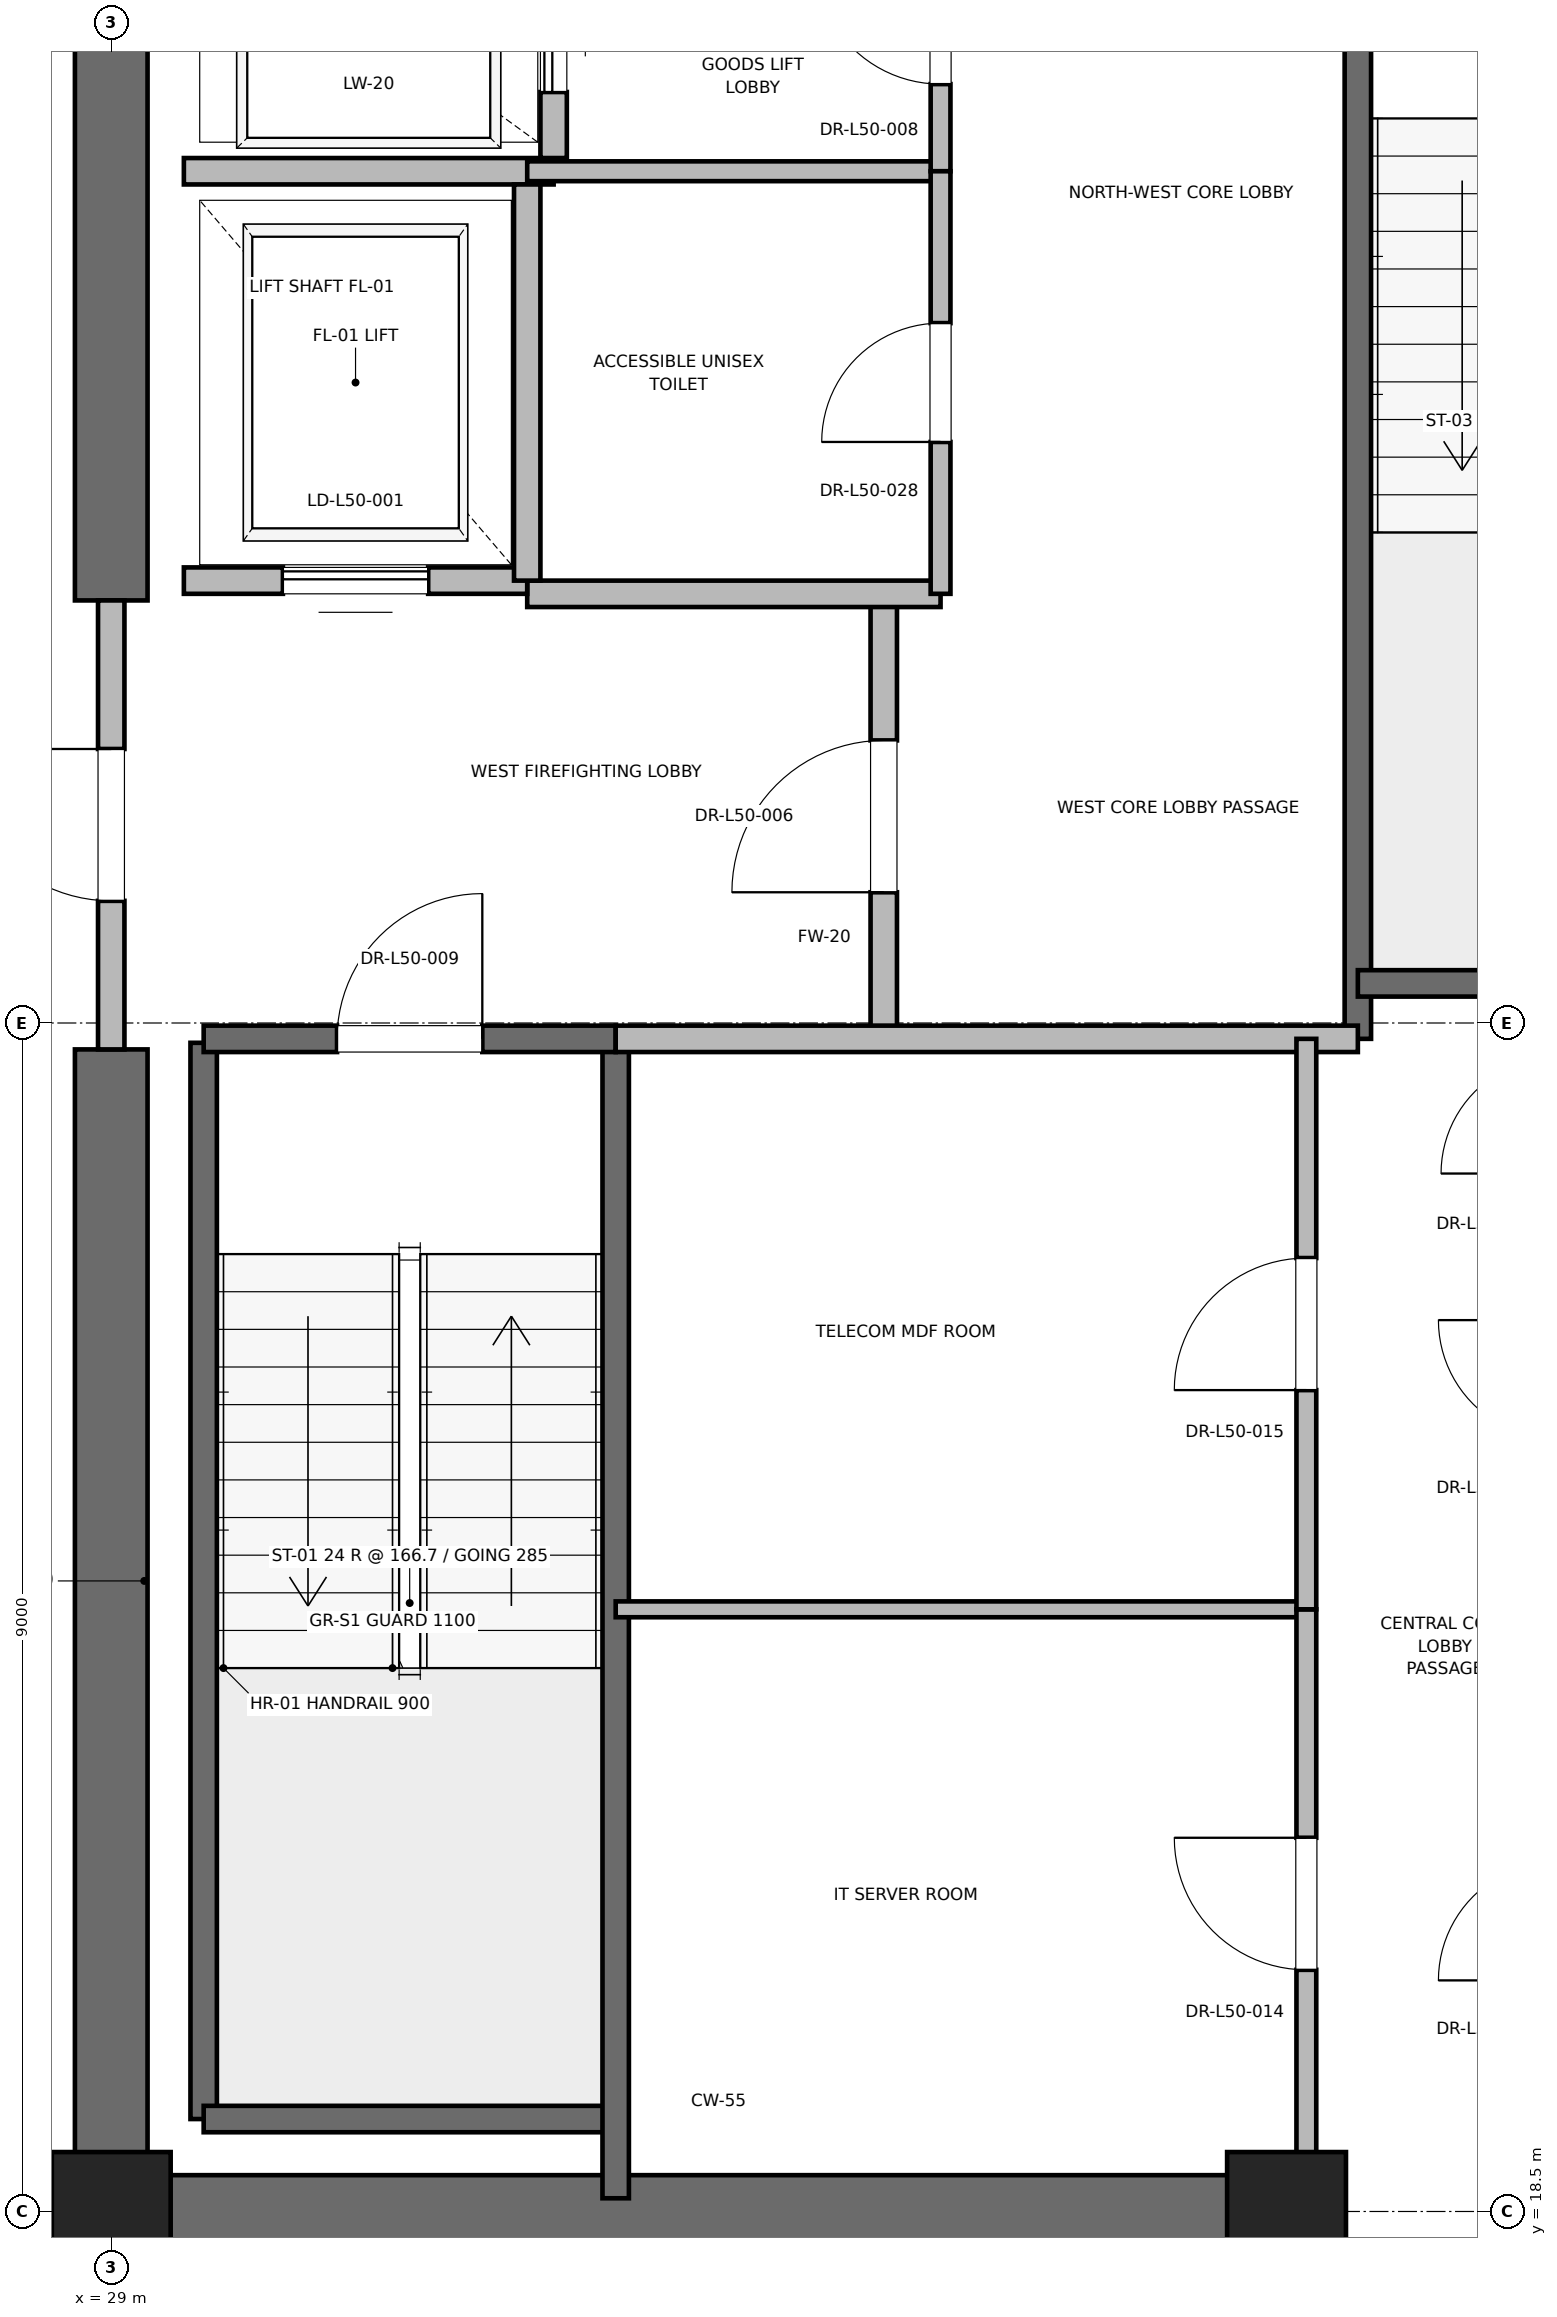
"""IFC4 building model, lengths in metres.
Left out: names, types, materials, properties, quantities, classifications, styles, units other than length and angle.
Written with IfcOpenShell. Run it as: python <this file> out.ifc"""

import sys

from ifc_helpers import new_model, si_unit, direction, frame, frame_2d, origin, origin_2d, place, context, subcontext, project, spatial, rectangle, extrude, element, fill, save


model = new_model("IFC4")
c1 = context("Model", 3, precision=1e-05, world=origin(), true_north=direction((0.0, 1.0)))
c2 = subcontext(c1, "Body", "Model", "MODEL_VIEW")
j1 = project(units=[si_unit("LENGTHUNIT", "METRE"), si_unit("PLANEANGLEUNIT", "RADIAN")], contexts=[c1])
p1 = place(None, origin())
s1 = spatial("IfcSite", under=j1, at=p1, CompositionType="ELEMENT")
p2 = place(p1, origin())
s2 = spatial("IfcBuilding", under=s1, at=p2, CompositionType="ELEMENT")
p3 = place(p2, frame((0.0, 0.0, 217.2)))
s3 = spatial("IfcBuildingStorey", under=s2, at=p3, CompositionType="ELEMENT", Elevation=217.2)
for number, where, z_axis, x_axis in (
    (1, (29.0, 18.5, 0.0), (0.0, 0.0, 1.0), (1.0, 0.0, 0.0)),
    (2, (37.9, 18.5, 0.0), (0.0, 0.0, 1.0), (1.0, 0.0, 0.0)),
):
    element("IfcColumn", number, at=place(p3, frame(where, z_axis=z_axis, x_axis=x_axis)), inside=s3, PredefinedType="PILASTER", context=c2, shape_type="SweptSolid", body=[
        extrude(rectangle(XDim=0.9, YDim=0.9, at=origin_2d()), origin(), (0.0, 0.0, 1.0), 4.0),
    ])
p4 = place(p3, frame((29.0, 18.5, 0.0), z_axis=(0.0, 0.0, 1.0), x_axis=(1.0, 0.0, 0.0)))
e3 = element("IfcWall", 3, at=p4, inside=s3, PredefinedType="SHEAR", context=c2, shape_type="SweptSolid", body=[
    extrude(rectangle(XDim=9.2, YDim=0.55, at=frame_2d((4.6, 0.0))), origin(), (0.0, 0.0, 1.0), 3.775),
])
p5 = place(p3, frame((29.0, 18.5, 0.0), z_axis=(0.0, 0.0, 1.0), x_axis=(0.0, 1.0, 0.0)))
e4 = element("IfcWall", 4, at=p5, inside=s3, PredefinedType="SHEAR", context=c2, shape_type="SweptSolid", body=[
    extrude(rectangle(XDim=8.8, YDim=0.55, at=frame_2d((4.4, 0.0))), origin(), (0.0, 0.0, 1.0), 3.775),
])
p6 = place(p3, frame((29.0, 30.7, 0.0), z_axis=(0.0, 0.0, 1.0), x_axis=(0.0, 1.0, 0.0)))
e5 = element("IfcWall", 5, at=p6, inside=s3, PredefinedType="SHEAR", context=c2, shape_type="SweptSolid", body=[
    extrude(rectangle(XDim=5.8, YDim=0.55, at=frame_2d((2.9, 0.0))), origin(), (0.0, 0.0, 1.0), 3.775),
])
p7 = place(p3, frame((29.7, 19.2, 0.0), z_axis=(0.0, 0.0, 1.0), x_axis=(0.0, 1.0, 0.0)))
e6 = element("IfcWall", 6, at=p7, inside=s3, PredefinedType="SOLIDWALL", context=c2, shape_type="SweptSolid", body=[
    extrude(rectangle(XDim=8.15, YDim=0.2, at=frame_2d((4.075, 0.0))), origin(), (0.0, 0.0, 1.0), 3.775),
])
p8 = place(p3, frame((29.7, 19.2, 0.0), z_axis=(0.0, 0.0, 1.0), x_axis=(1.0, 0.0, 0.0)))
e7 = element("IfcWall", 7, at=p8, inside=s3, PredefinedType="SOLIDWALL", context=c2, shape_type="SweptSolid", body=[
    extrude(rectangle(XDim=3.12, YDim=0.2, at=frame_2d((1.56, 0.0))), origin(), (0.0, 0.0, 1.0), 3.775),
])
p9 = place(p3, frame((32.82, 18.6, 0.0), z_axis=(0.0, 0.0, 1.0), x_axis=(0.0, 1.0, 0.0)))
e8 = element("IfcWall", 8, at=p9, inside=s3, PredefinedType="SOLIDWALL", context=c2, shape_type="SweptSolid", body=[
    extrude(rectangle(XDim=8.78, YDim=0.2, at=frame_2d((4.39, 0.0))), origin(), (0.0, 0.0, 1.0), 3.775),
])
p10 = place(p3, frame((29.7, 27.38, 0.0), z_axis=(0.0, 0.0, 1.0), x_axis=(1.0, 0.0, 0.0)))
e9 = element("IfcWall", 9, at=p10, inside=s3, PredefinedType="SOLIDWALL", context=c2, shape_type="SweptSolid", body=[
    extrude(rectangle(XDim=3.12, YDim=0.2, at=frame_2d((1.56, 0.0))), origin(), (0.0, 0.0, 1.0), 3.775),
])
p11 = place(p10, frame((1.01, 0.0, 0.0)))
e10 = element("IfcOpeningElement", 10, at=p11, cuts=e9, PredefinedType="OPENING", context=c2, shape_type="SweptSolid", body=[
    extrude(rectangle(XDim=1.1, YDim=2.15, at=frame_2d((0.55, 1.075))), frame((0.0, 0.1, 0.0), z_axis=(0.0, -1.0, 0.0), x_axis=(1.0, 0.0, 0.0)), (0.0, 0.0, 1.0), 0.2),
])
p12 = place(p3, frame((38.44, 27.38, 0.0), z_axis=(0.0, 0.0, 1.0), x_axis=(0.0, 1.0, 0.0)))
e11 = element("IfcWall", 11, at=p12, inside=s3, PredefinedType="SOLIDWALL", context=c2, shape_type="SweptSolid", body=[
    extrude(rectangle(XDim=8.87, YDim=0.2, at=frame_2d((4.435, 0.0))), origin(), (0.0, 0.0, 1.0), 3.775),
])
p13 = place(p3, frame((38.44, 27.8, 0.0), z_axis=(0.0, 0.0, 1.0), x_axis=(1.0, 0.0, 0.0)))
e12 = element("IfcWall", 12, at=p13, inside=s3, PredefinedType="SOLIDWALL", context=c2, shape_type="SweptSolid", body=[
    extrude(rectangle(XDim=3.32, YDim=0.2, at=frame_2d((1.66, 0.0))), origin(), (0.0, 0.0, 1.0), 3.775),
])
p14 = place(p3, frame((34.85, 27.38, 0.0), z_axis=(0.0, 0.0, 1.0), x_axis=(0.0, 1.0, 0.0)))
e13 = element("IfcWall", 13, at=p14, inside=s3, PredefinedType="PARTITIONING", context=c2, shape_type="SweptSolid", body=[
    extrude(rectangle(XDim=3.37, YDim=0.2, at=frame_2d((1.685, 0.0))), origin(), (0.0, 0.0, 1.0), 3.775),
])
p15 = place(p14, frame((1.11, 0.0, 0.0)))
e14 = element("IfcOpeningElement", 14, at=p15, cuts=e13, PredefinedType="OPENING", context=c2, shape_type="SweptSolid", body=[
    extrude(rectangle(XDim=1.15, YDim=2.2, at=frame_2d((0.575, 1.1))), frame((0.0, 0.1, 0.0), z_axis=(0.0, -1.0, 0.0), x_axis=(1.0, 0.0, 0.0)), (0.0, 0.0, 1.0), 0.2),
])
p16 = place(p3, frame((29.0, 27.3, 0.0), z_axis=(0.0, 0.0, 1.0), x_axis=(0.0, 1.0, 0.0)))
e15 = element("IfcWall", 15, at=p16, inside=s3, PredefinedType="PARTITIONING", context=c2, shape_type="SweptSolid", body=[
    extrude(rectangle(XDim=3.4, YDim=0.2, at=frame_2d((1.7, 0.0))), origin(), (0.0, 0.0, 1.0), 2.755),
])
p17 = place(p16, frame((1.125, 0.0, 0.0)))
e16 = element("IfcOpeningElement", 16, at=p17, cuts=e15, PredefinedType="OPENING", context=c2, shape_type="SweptSolid", body=[
    extrude(rectangle(XDim=1.15, YDim=2.2, at=frame_2d((0.575, 1.1))), frame((0.0, 0.1, 0.0), z_axis=(0.0, -1.0, 0.0), x_axis=(1.0, 0.0, 0.0)), (0.0, 0.0, 1.0), 0.2),
])
p18 = place(p3, frame((32.82, 27.38, 0.0), z_axis=(0.0, 0.0, 1.0), x_axis=(1.0, 0.0, 0.0)))
e17 = element("IfcWall", 17, at=p18, inside=s3, PredefinedType="PARTITIONING", context=c2, shape_type="SweptSolid", body=[
    extrude(rectangle(XDim=5.62, YDim=0.2, at=frame_2d((2.81, 0.0))), origin(), (0.0, 0.0, 1.0), 3.775),
])
p19 = place(p3, frame((32.15, 30.75, 0.0), z_axis=(0.0, 0.0, 1.0), x_axis=(1.0, 0.0, 0.0)))
e18 = element("IfcWall", 18, at=p19, inside=s3, PredefinedType="PARTITIONING", context=c2, shape_type="SweptSolid", body=[
    extrude(rectangle(XDim=3.13, YDim=0.2, at=frame_2d((1.565, 0.0))), origin(), (0.0, 0.0, 1.0), 3.775),
])
p20 = place(p3, frame((29.55, 30.85, 0.0), z_axis=(0.0, 0.0, 1.0), x_axis=(1.0, 0.0, 0.0)))
e19 = element("IfcWall", 19, at=p20, inside=s3, PredefinedType="SOLIDWALL", context=c2, shape_type="SweptSolid", body=[
    extrude(rectangle(XDim=2.6, YDim=0.2, at=frame_2d((1.3, 0.0))), origin(), (0.0, 0.0, 1.0), 2.755),
])
p21 = place(p20, frame((0.75, 0.0, 0.0)))
e20 = element("IfcOpeningElement", 20, at=p21, cuts=e19, PredefinedType="OPENING", context=c2, shape_type="SweptSolid", body=[
    extrude(rectangle(XDim=1.1, YDim=2.2, at=frame_2d((0.55, 1.1))), frame((0.0, 0.1, 0.0), z_axis=(0.0, -1.0, 0.0), x_axis=(1.0, 0.0, 0.0)), (0.0, 0.0, 1.0), 0.2),
])
p22 = place(p3, frame((29.55, 33.95, 0.0), z_axis=(0.0, 0.0, 1.0), x_axis=(1.0, 0.0, 0.0)))
e21 = element("IfcWall", 21, at=p22, inside=s3, PredefinedType="SOLIDWALL", context=c2, shape_type="SweptSolid", body=[
    extrude(rectangle(XDim=2.8, YDim=0.2, at=frame_2d((1.4, 0.0))), origin(), (0.0, 0.0, 1.0), 3.775),
])
p23 = place(p3, frame((32.15, 30.85, 0.0), z_axis=(0.0, 0.0, 1.0), x_axis=(0.0, 1.0, 0.0)))
e22 = element("IfcWall", 22, at=p23, inside=s3, PredefinedType="SOLIDWALL", context=c2, shape_type="SweptSolid", body=[
    extrude(rectangle(XDim=3.0, YDim=0.2, at=frame_2d((1.5, 0.0))), origin(), (0.0, 0.0, 1.0), 3.775),
])
p24 = place(p3, frame((32.35, 34.05, 0.0), z_axis=(0.0, 0.0, 1.0), x_axis=(0.0, 1.0, 0.0)))
e23 = element("IfcWall", 23, at=p24, inside=s3, PredefinedType="SOLIDWALL", context=c2, shape_type="SweptSolid", body=[
    extrude(rectangle(XDim=2.1, YDim=0.2, at=frame_2d((1.05, 0.0))), origin(), (0.0, 0.0, 1.0), 3.775),
])
p25 = place(p24, frame((0.5, 0.0, 0.0)))
e24 = element("IfcOpeningElement", 24, at=p25, cuts=e23, PredefinedType="OPENING", context=c2, shape_type="SweptSolid", body=[
    extrude(rectangle(XDim=1.1, YDim=2.2, at=frame_2d((0.55, 1.1))), frame((0.0, 0.1, 0.0), z_axis=(0.0, -1.0, 0.0), x_axis=(1.0, 0.0, 0.0)), (0.0, 0.0, 1.0), 0.2),
])
p26 = place(p3, frame((32.15, 33.95, 0.0), z_axis=(0.0, 0.0, 1.0), x_axis=(1.0, 0.0, 0.0)))
e25 = element("IfcWall", 25, at=p26, inside=s3, PredefinedType="PARTITIONING", context=c2, shape_type="SweptSolid", body=[
    extrude(rectangle(XDim=3.13, YDim=0.15, at=frame_2d((1.565, 0.0))), origin(), (0.0, 0.0, 1.0), 2.85),
])
p27 = place(p3, frame((35.28, 33.95, 0.0), z_axis=(0.0, 0.0, 1.0), x_axis=(0.0, 1.0, 0.0)))
e26 = element("IfcWall", 26, at=p27, inside=s3, PredefinedType="PARTITIONING", context=c2, shape_type="SweptSolid", body=[
    extrude(rectangle(XDim=2.27, YDim=0.15, at=frame_2d((1.135, 0.0))), origin(), (0.0, 0.0, 1.0), 2.755),
])
p28 = place(p27, frame((0.66, 0.0, 0.0)))
e27 = element("IfcOpeningElement", 27, at=p28, cuts=e26, PredefinedType="OPENING", context=c2, shape_type="SweptSolid", body=[
    extrude(rectangle(XDim=0.95, YDim=2.15, at=frame_2d((0.475, 1.075))), frame((0.0, 0.075, 0.0), z_axis=(0.0, -1.0, 0.0), x_axis=(1.0, 0.0, 0.0)), (0.0, 0.0, 1.0), 0.15),
])
p29 = place(p3, frame((35.28, 30.75, 0.0), z_axis=(0.0, 0.0, 1.0), x_axis=(0.0, 1.0, 0.0)))
e28 = element("IfcWall", 28, at=p29, inside=s3, PredefinedType="PARTITIONING", context=c2, shape_type="SweptSolid", body=[
    extrude(rectangle(XDim=3.2, YDim=0.15, at=frame_2d((1.6, 0.0))), origin(), (0.0, 0.0, 1.0), 2.85),
])
p30 = place(p29, frame((1.15, 0.0, 0.0)))
e29 = element("IfcOpeningElement", 29, at=p30, cuts=e28, PredefinedType="OPENING", context=c2, shape_type="SweptSolid", body=[
    extrude(rectangle(XDim=0.9, YDim=2.1, at=frame_2d((0.45, 1.05))), frame((0.0, 0.075, 0.0), z_axis=(0.0, -1.0, 0.0), x_axis=(1.0, 0.0, 0.0)), (0.0, 0.0, 1.0), 0.15),
])
p31 = place(p3, frame((32.82, 23.06, 0.0), z_axis=(0.0, 0.0, 1.0), x_axis=(1.0, 0.0, 0.0)))
e30 = element("IfcWall", 30, at=p31, inside=s3, PredefinedType="PARTITIONING", context=c2, shape_type="SweptSolid", body=[
    extrude(rectangle(XDim=5.23, YDim=0.12, at=frame_2d((2.615, 0.0))), origin(), (0.0, 0.0, 1.0), 2.85),
])
p32 = place(p3, frame((38.05, 18.6, 0.0), z_axis=(0.0, 0.0, 1.0), x_axis=(0.0, 1.0, 0.0)))
e31 = element("IfcWall", 31, at=p32, inside=s3, PredefinedType="PARTITIONING", context=c2, shape_type="SweptSolid", body=[
    extrude(rectangle(XDim=4.46, YDim=0.15, at=frame_2d((2.23, 0.0))), origin(), (0.0, 0.0, 1.0), 2.755),
])
p33 = place(p32, frame((1.73, 0.0, 0.0)))
e32 = element("IfcOpeningElement", 32, at=p33, cuts=e31, PredefinedType="OPENING", context=c2, shape_type="SweptSolid", body=[
    extrude(rectangle(XDim=1.0, YDim=2.15, at=frame_2d((0.5, 1.075))), frame((0.0, 0.075, 0.0), z_axis=(0.0, -1.0, 0.0), x_axis=(1.0, 0.0, 0.0)), (0.0, 0.0, 1.0), 0.15),
])
p34 = place(p3, frame((38.05, 23.06, 0.0), z_axis=(0.0, 0.0, 1.0), x_axis=(0.0, 1.0, 0.0)))
e33 = element("IfcWall", 33, at=p34, inside=s3, PredefinedType="PARTITIONING", context=c2, shape_type="SweptSolid", body=[
    extrude(rectangle(XDim=4.32, YDim=0.15, at=frame_2d((2.16, 0.0))), origin(), (0.0, 0.0, 1.0), 2.85),
])
p35 = place(p34, frame((1.66, 0.0, 0.0)))
e34 = element("IfcOpeningElement", 34, at=p35, cuts=e33, PredefinedType="OPENING", context=c2, shape_type="SweptSolid", body=[
    extrude(rectangle(XDim=1.0, YDim=2.15, at=frame_2d((0.5, 1.075))), frame((0.0, 0.075, 0.0), z_axis=(0.0, -1.0, 0.0), x_axis=(1.0, 0.0, 0.0)), (0.0, 0.0, 1.0), 0.15),
])
p36 = place(p11, origin())
e35 = element("IfcDoor", 35, at=p36, inside=s3, OperationType="SINGLE_SWING_RIGHT", PredefinedType="DOOR", context=c2, shape_type="SweptSolid", body=[
    extrude(rectangle(XDim=1.1, YDim=2.15, at=frame_2d((0.55, 1.075))), frame((0.0, 0.025, 0.0), z_axis=(0.0, -1.0, 0.0), x_axis=(1.0, 0.0, 0.0)), (0.0, 0.0, 1.0), 0.05),
])
fill(e10, e35)
p37 = place(p15, origin())
e36 = element("IfcDoor", 36, at=p37, inside=s3, OperationType="SINGLE_SWING_LEFT", PredefinedType="DOOR", context=c2, shape_type="SweptSolid", body=[
    extrude(rectangle(XDim=1.15, YDim=2.2, at=frame_2d((0.575, 1.1))), frame((0.0, 0.025, 0.0), z_axis=(0.0, -1.0, 0.0), x_axis=(1.0, 0.0, 0.0)), (0.0, 0.0, 1.0), 0.05),
])
fill(e14, e36)
p38 = place(p17, origin())
e37 = element("IfcDoor", 37, at=p38, inside=s3, OperationType="SINGLE_SWING_RIGHT", PredefinedType="DOOR", context=c2, shape_type="SweptSolid", body=[
    extrude(rectangle(XDim=1.15, YDim=2.2, at=frame_2d((0.575, 1.1))), frame((0.0, 0.025, 0.0), z_axis=(0.0, -1.0, 0.0), x_axis=(1.0, 0.0, 0.0)), (0.0, 0.0, 1.0), 0.05),
])
fill(e16, e37)
p39 = place(p21, origin())
e38 = element("IfcDoor", 38, at=p39, inside=s3, OperationType="SLIDING_TO_RIGHT", PredefinedType="DOOR", context=c2, shape_type="SweptSolid", body=[
    extrude(rectangle(XDim=1.1, YDim=2.2, at=frame_2d((0.55, 1.1))), frame((0.0, 0.025, 0.0), z_axis=(0.0, -1.0, 0.0), x_axis=(1.0, 0.0, 0.0)), (0.0, 0.0, 1.0), 0.05),
])
fill(e20, e38)
p40 = place(p25, origin())
e39 = element("IfcDoor", 39, at=p40, inside=s3, OperationType="SLIDING_TO_RIGHT", PredefinedType="DOOR", context=c2, shape_type="SweptSolid", body=[
    extrude(rectangle(XDim=1.1, YDim=2.2, at=frame_2d((0.55, 1.1))), frame((0.0, 0.025, 0.0), z_axis=(0.0, -1.0, 0.0), x_axis=(1.0, 0.0, 0.0)), (0.0, 0.0, 1.0), 0.05),
])
fill(e24, e39)
p41 = place(p28, origin())
e40 = element("IfcDoor", 40, at=p41, inside=s3, OperationType="SINGLE_SWING_RIGHT", PredefinedType="DOOR", context=c2, shape_type="SweptSolid", body=[
    extrude(rectangle(XDim=0.95, YDim=2.15, at=frame_2d((0.475, 1.075))), frame((0.0, 0.025, 0.0), z_axis=(0.0, -1.0, 0.0), x_axis=(1.0, 0.0, 0.0)), (0.0, 0.0, 1.0), 0.05),
])
fill(e27, e40)
p42 = place(p30, origin())
e41 = element("IfcDoor", 41, at=p42, inside=s3, OperationType="SINGLE_SWING_LEFT", PredefinedType="DOOR", context=c2, shape_type="SweptSolid", body=[
    extrude(rectangle(XDim=0.9, YDim=2.1, at=frame_2d((0.45, 1.05))), frame((0.0, 0.025, 0.0), z_axis=(0.0, -1.0, 0.0), x_axis=(1.0, 0.0, 0.0)), (0.0, 0.0, 1.0), 0.05),
])
fill(e29, e41)
p43 = place(p33, origin())
e42 = element("IfcDoor", 42, at=p43, inside=s3, OperationType="SINGLE_SWING_RIGHT", PredefinedType="DOOR", context=c2, shape_type="SweptSolid", body=[
    extrude(rectangle(XDim=1.0, YDim=2.15, at=frame_2d((0.5, 1.075))), frame((0.0, 0.025, 0.0), z_axis=(0.0, -1.0, 0.0), x_axis=(1.0, 0.0, 0.0)), (0.0, 0.0, 1.0), 0.05),
])
fill(e32, e42)
p44 = place(p35, origin())
e43 = element("IfcDoor", 43, at=p44, inside=s3, OperationType="SINGLE_SWING_LEFT", PredefinedType="DOOR", context=c2, shape_type="SweptSolid", body=[
    extrude(rectangle(XDim=1.0, YDim=2.15, at=frame_2d((0.5, 1.075))), frame((0.0, 0.025, 0.0), z_axis=(0.0, -1.0, 0.0), x_axis=(1.0, 0.0, 0.0)), (0.0, 0.0, 1.0), 0.05),
])
fill(e34, e43)
save(model, sys.argv[1])
